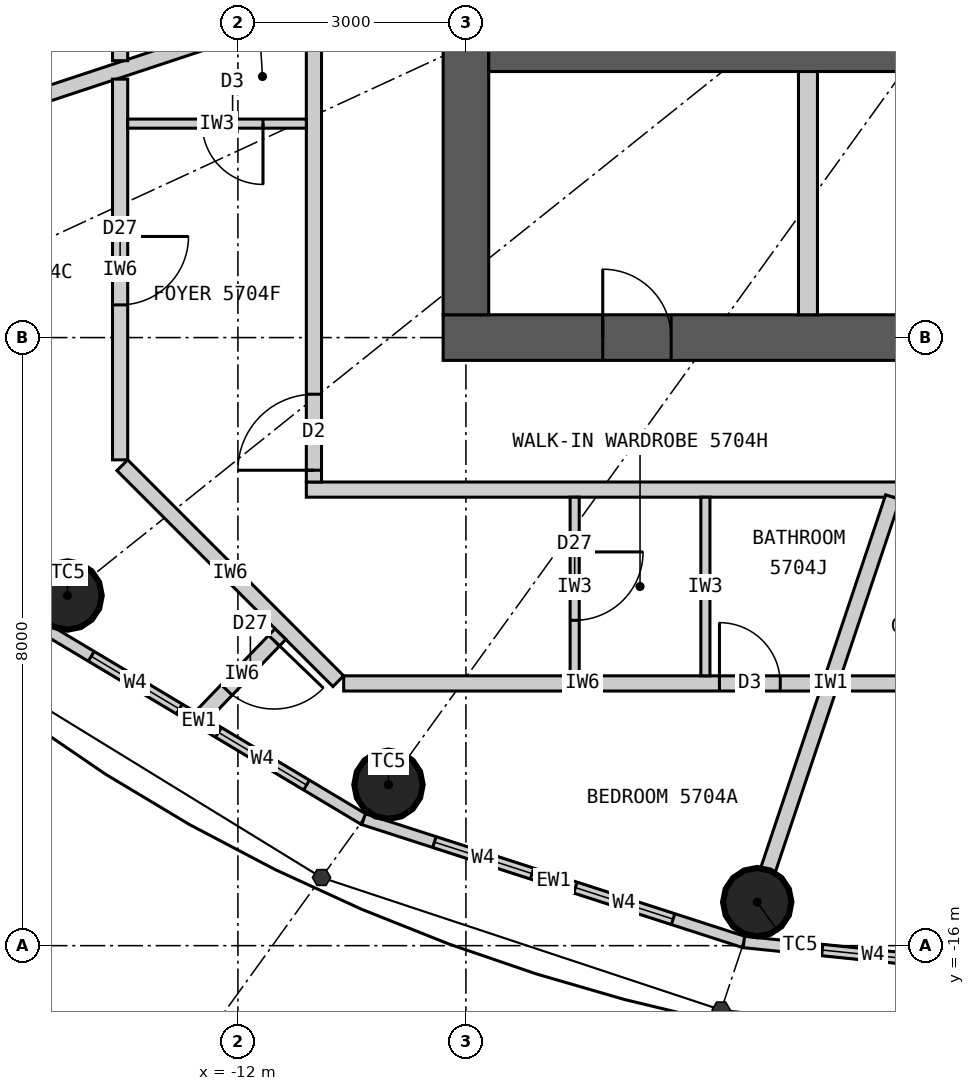
"""IFC4 building model, lengths in metres.
Left out: names, types, materials, properties, quantities, classifications, styles, units other than length and angle.
Written with IfcOpenShell. Run it as: python <this file> out.ifc"""

import sys

from ifc_helpers import new_model, si_unit, direction, frame, frame_2d, origin, origin_2d, place, context, subcontext, project, spatial, rectangle, circle, extrude, element, fill, save


model = new_model("IFC4")
c1 = context("Model", 3, precision=1e-05, world=origin(), true_north=direction((0.0, 1.0)))
c2 = subcontext(c1, "Body", "Model", "MODEL_VIEW")
j1 = project(units=[si_unit("LENGTHUNIT", "METRE"), si_unit("PLANEANGLEUNIT", "RADIAN")], contexts=[c1])
p1 = place(None, origin())
s1 = spatial("IfcSite", under=j1, at=p1, CompositionType="ELEMENT")
p2 = place(p1, origin())
s2 = spatial("IfcBuilding", under=s1, at=p2, CompositionType="ELEMENT")
p3 = place(p2, frame((0.0, 0.0, 212.7)))
s3 = spatial("IfcBuildingStorey", under=s2, at=p3, CompositionType="ELEMENT", Elevation=212.7)
for number, where, z_axis, x_axis in (
    (1, (-14.241, -11.393, 0.0), (0.0, 0.0, 1.0), (1.0, 0.0, 0.0)),
    (2, (-10.019, -13.883, 0.0), (0.0, 0.0, 1.0), (1.0, 0.0, 0.0)),
    (3, (-5.167, -15.427, 0.0), (0.0, 0.0, 1.0), (1.0, 0.0, 0.0)),
):
    element("IfcColumn", number, at=place(p3, frame(where, z_axis=z_axis, x_axis=x_axis)), inside=s3, PredefinedType="COLUMN", context=c2, shape_type="SweptSolid", body=[
        extrude(circle(Radius=0.45, at=origin_2d()), origin(), (0.0, 0.0, 1.0), 3.3),
    ])
p4 = place(p3, frame((9.3, -8.0, 0.0), z_axis=(0.0, 0.0, 1.0), x_axis=(-1.0, 0.0, 0.0)))
e4 = element("IfcWall", 4, at=p4, inside=s3, PredefinedType="SHEAR", context=c2, shape_type="SweptSolid", body=[
    extrude(rectangle(XDim=18.6, YDim=0.6, at=frame_2d((9.3, 0.0))), origin(), (0.0, 0.0, 1.0), 3.3),
])
p5 = place(p4, frame((8.0, 0.0, 0.0)))
e5 = element("IfcOpeningElement", 5, at=p5, cuts=e4, PredefinedType="OPENING", context=c2, shape_type="SweptSolid", body=[
    extrude(rectangle(XDim=1.2, YDim=2.2, at=frame_2d((0.6, 1.1))), frame((0.0, 0.31, 0.0), z_axis=(0.0, -1.0, 0.0), x_axis=(1.0, 0.0, 0.0)), (0.0, 0.0, 1.0), 0.62),
])
p6 = place(p4, frame((15.6, 0.0, 0.0)))
e6 = element("IfcOpeningElement", 6, at=p6, cuts=e4, PredefinedType="OPENING", context=c2, shape_type="SweptSolid", body=[
    extrude(rectangle(XDim=0.9, YDim=2.2, at=frame_2d((0.45, 1.1))), frame((0.0, 0.31, 0.0), z_axis=(0.0, -1.0, 0.0), x_axis=(1.0, 0.0, 0.0)), (0.0, 0.0, 1.0), 0.62),
])
p7 = place(p3, frame((-9.0, 7.7, 0.0), z_axis=(0.0, 0.0, 1.0), x_axis=(0.0, -1.0, 0.0)))
e7 = element("IfcWall", 7, at=p7, inside=s3, PredefinedType="SHEAR", context=c2, shape_type="SweptSolid", body=[
    extrude(rectangle(XDim=15.4, YDim=0.6, at=frame_2d((7.7, 0.0))), origin(), (0.0, 0.0, 1.0), 3.3),
])
p8 = place(p7, frame((6.8, 0.0, 0.0)))
e8 = element("IfcOpeningElement", 8, at=p8, cuts=e7, PredefinedType="OPENING", context=c2, shape_type="SweptSolid", body=[
    extrude(rectangle(XDim=1.8, YDim=2.2, at=frame_2d((0.9, 1.1))), frame((0.0, 0.31, 0.0), z_axis=(0.0, -1.0, 0.0), x_axis=(1.0, 0.0, 0.0)), (0.0, 0.0, 1.0), 0.62),
])
p9 = place(p3, frame((-8.7, -4.3, 0.0), z_axis=(0.0, 0.0, 1.0), x_axis=(1.0, 0.0, 0.0)))
e9 = element("IfcWall", 9, at=p9, inside=s3, PredefinedType="SHEAR", context=c2, shape_type="SweptSolid", body=[
    extrude(rectangle(XDim=17.4, YDim=0.4, at=frame_2d((8.7, 0.0))), origin(), (0.0, 0.0, 1.0), 3.3),
])
p10 = place(p3, frame((-4.5, -7.7, 0.0), z_axis=(0.0, 0.0, 1.0), x_axis=(0.0, 1.0, 0.0)))
e10 = element("IfcWall", 10, at=p10, inside=s3, PredefinedType="PARTITIONING", context=c2, shape_type="SweptSolid", body=[
    extrude(rectangle(XDim=3.2, YDim=0.25, at=frame_2d((1.6, 0.0))), origin(), (0.0, 0.0, 1.0), 3.3),
])
p11 = place(p3, frame((-14.68, -11.744, 0.0), z_axis=(0.0, 0.0, 1.0), x_axis=(0.85822150553, -0.513279502265, 0.0)))
e11 = element("IfcWall", 11, at=p11, inside=s3, PredefinedType="ELEMENTEDWALL", context=c2, shape_type="SweptSolid", body=[
    extrude(rectangle(XDim=5.05, YDim=0.15, at=frame_2d((2.525, 0.0))), origin(), (0.0, 0.0, 1.0), 3.12),
])
p12 = place(p11, frame((0.875, 0.0, 0.9)))
e12 = element("IfcOpeningElement", 12, at=p12, cuts=e11, PredefinedType="OPENING", context=c2, shape_type="SweptSolid", body=[
    extrude(rectangle(XDim=1.35, YDim=1.9, at=frame_2d((0.675, 0.95))), frame((0.0, 0.085, 0.0), z_axis=(0.0, -1.0, 0.0), x_axis=(1.0, 0.0, 0.0)), (0.0, 0.0, 1.0), 0.17),
])
p13 = place(p11, frame((2.825, 0.0, 0.9)))
e13 = element("IfcOpeningElement", 13, at=p13, cuts=e11, PredefinedType="OPENING", context=c2, shape_type="SweptSolid", body=[
    extrude(rectangle(XDim=1.35, YDim=1.9, at=frame_2d((0.675, 0.95))), frame((0.0, 0.085, 0.0), z_axis=(0.0, -1.0, 0.0), x_axis=(1.0, 0.0, 0.0)), (0.0, 0.0, 1.0), 0.17),
])
p14 = place(p3, frame((-10.346, -14.336, 0.0), z_axis=(0.0, 0.0, 1.0), x_axis=(0.951644702515, -0.307200846638, 0.0)))
e14 = element("IfcWall", 14, at=p14, inside=s3, PredefinedType="ELEMENTEDWALL", context=c2, shape_type="SweptSolid", body=[
    extrude(rectangle(XDim=5.258, YDim=0.15, at=frame_2d((2.629, 0.0))), origin(), (0.0, 0.0, 1.0), 3.12),
])
p15 = place(p14, frame((0.979, 0.0, 0.9)))
e15 = element("IfcOpeningElement", 15, at=p15, cuts=e14, PredefinedType="OPENING", context=c2, shape_type="SweptSolid", body=[
    extrude(rectangle(XDim=1.35, YDim=1.9, at=frame_2d((0.675, 0.95))), frame((0.0, 0.085, 0.0), z_axis=(0.0, -1.0, 0.0), x_axis=(1.0, 0.0, 0.0)), (0.0, 0.0, 1.0), 0.17),
])
p16 = place(p14, frame((2.929, 0.0, 0.9)))
e16 = element("IfcOpeningElement", 16, at=p16, cuts=e14, PredefinedType="OPENING", context=c2, shape_type="SweptSolid", body=[
    extrude(rectangle(XDim=1.35, YDim=1.9, at=frame_2d((0.675, 0.95))), frame((0.0, 0.085, 0.0), z_axis=(0.0, -1.0, 0.0), x_axis=(1.0, 0.0, 0.0)), (0.0, 0.0, 1.0), 0.17),
])
p17 = place(p3, frame((-5.343, -15.952, 0.0), z_axis=(0.0, 0.0, 1.0), x_axis=(0.994774574972, -0.102095763818, 0.0)))
e17 = element("IfcWall", 17, at=p17, inside=s3, PredefinedType="ELEMENTEDWALL", context=c2, shape_type="SweptSolid", body=[
    extrude(rectangle(XDim=5.371, YDim=0.15, at=frame_2d((2.686, 0.0))), origin(), (0.0, 0.0, 1.0), 3.12),
])
p18 = place(p17, frame((1.035, 0.0, 0.9)))
e18 = element("IfcOpeningElement", 18, at=p18, cuts=e17, PredefinedType="OPENING", context=c2, shape_type="SweptSolid", body=[
    extrude(rectangle(XDim=1.35, YDim=1.9, at=frame_2d((0.675, 0.95))), frame((0.0, 0.085, 0.0), z_axis=(0.0, -1.0, 0.0), x_axis=(1.0, 0.0, 0.0)), (0.0, 0.0, 1.0), 0.17),
])
p19 = place(p17, frame((2.985, 0.0, 0.9)))
e19 = element("IfcOpeningElement", 19, at=p19, cuts=e17, PredefinedType="OPENING", context=c2, shape_type="SweptSolid", body=[
    extrude(rectangle(XDim=1.35, YDim=1.9, at=frame_2d((0.675, 0.95))), frame((0.0, 0.085, 0.0), z_axis=(0.0, -1.0, 0.0), x_axis=(1.0, 0.0, 0.0)), (0.0, 0.0, 1.0), 0.17),
])
p20 = place(p3, frame((11.1, -10.0, 0.0), z_axis=(0.0, 0.0, 1.0), x_axis=(-1.0, 0.0, 0.0)))
e20 = element("IfcWall", 20, at=p20, inside=s3, PredefinedType="PARTITIONING", context=c2, shape_type="SweptSolid", body=[
    extrude(rectangle(XDim=22.2, YDim=0.2, at=frame_2d((11.1, 0.0))), origin(), (0.0, 0.0, 1.0), 3.12),
])
p21 = place(p20, frame((11.36, 0.0, 0.0)))
e21 = element("IfcOpeningElement", 21, at=p21, cuts=e20, PredefinedType="OPENING", context=c2, shape_type="SweptSolid", body=[
    extrude(rectangle(XDim=1.0, YDim=2.2, at=frame_2d((0.5, 1.1))), frame((0.0, 0.11, 0.0), z_axis=(0.0, -1.0, 0.0), x_axis=(1.0, 0.0, 0.0)), (0.0, 0.0, 1.0), 0.22),
])
p22 = place(p20, frame((0.595, 0.0, 0.0)))
e22 = element("IfcOpeningElement", 22, at=p22, cuts=e20, PredefinedType="OPENING", context=c2, shape_type="SweptSolid", body=[
    extrude(rectangle(XDim=1.0, YDim=2.2, at=frame_2d((0.5, 1.1))), frame((0.0, 0.11, 0.0), z_axis=(0.0, -1.0, 0.0), x_axis=(1.0, 0.0, 0.0)), (0.0, 0.0, 1.0), 0.22),
])
p23 = place(p3, frame((-11.0, 9.9, 0.0), z_axis=(0.0, 0.0, 1.0), x_axis=(0.0, -1.0, 0.0)))
e23 = element("IfcWall", 23, at=p23, inside=s3, PredefinedType="PARTITIONING", context=c2, shape_type="SweptSolid", body=[
    extrude(rectangle(XDim=19.8, YDim=0.2, at=frame_2d((9.9, 0.0))), origin(), (0.0, 0.0, 1.0), 3.12),
])
p24 = place(p23, frame((5.075, 0.0, 0.0)))
e24 = element("IfcOpeningElement", 24, at=p24, cuts=e23, PredefinedType="OPENING", context=c2, shape_type="SweptSolid", body=[
    extrude(rectangle(XDim=1.0, YDim=2.2, at=frame_2d((0.5, 1.1))), frame((0.0, 0.11, 0.0), z_axis=(0.0, -1.0, 0.0), x_axis=(1.0, 0.0, 0.0)), (0.0, 0.0, 1.0), 0.22),
])
p25 = place(p23, frame((18.645, 0.0, 0.0)))
e25 = element("IfcOpeningElement", 25, at=p25, cuts=e23, PredefinedType="OPENING", context=c2, shape_type="SweptSolid", body=[
    extrude(rectangle(XDim=1.0, YDim=2.2, at=frame_2d((0.5, 1.1))), frame((0.0, 0.11, 0.0), z_axis=(0.0, -1.0, 0.0), x_axis=(1.0, 0.0, 0.0)), (0.0, 0.0, 1.0), 0.22),
])
p26 = place(p3, frame((-11.1, -3.669, 0.0), z_axis=(0.0, 0.0, 1.0), x_axis=(-0.949476668397, -0.313837627079, 0.0)))
e26 = element("IfcWall", 26, at=p26, inside=s3, PredefinedType="PARTITIONING", context=c2, shape_type="SweptSolid", body=[
    extrude(rectangle(XDim=8.339, YDim=0.2, at=frame_2d((4.169, 0.0))), origin(), (0.0, 0.0, 1.0), 3.12),
])
p27 = place(p3, frame((-3.383, -10.1, 0.0), z_axis=(0.0, 0.0, 1.0), x_axis=(-0.317602151035, -0.948224063003, 0.0)))
e27 = element("IfcWall", 27, at=p27, inside=s3, PredefinedType="PARTITIONING", context=c2, shape_type="SweptSolid", body=[
    extrude(rectangle(XDim=5.168, YDim=0.2, at=frame_2d((2.584, 0.0))), origin(), (0.0, 0.0, 1.0), 2.42),
])
p28 = place(p3, frame((-13.55, 8.139, 0.0), z_axis=(0.0, 0.0, 1.0), x_axis=(0.0, -1.0, 0.0)))
e28 = element("IfcWall", 28, at=p28, inside=s3, PredefinedType="PARTITIONING", context=c2, shape_type="SweptSolid", body=[
    extrude(rectangle(XDim=12.496, YDim=0.2, at=frame_2d((6.248, 0.0))), origin(), (0.0, 0.0, 1.0), 3.12),
])
p29 = place(p28, frame((7.031, 0.0, 0.0)))
e29 = element("IfcOpeningElement", 29, at=p29, cuts=e28, PredefinedType="OPENING", context=c2, shape_type="SweptSolid", body=[
    extrude(rectangle(XDim=0.9, YDim=2.1, at=frame_2d((0.45, 1.05))), frame((0.0, 0.11, 0.0), z_axis=(0.0, -1.0, 0.0), x_axis=(1.0, 0.0, 0.0)), (0.0, 0.0, 1.0), 0.22),
])
p30 = place(p28, frame((9.373, 0.0, 0.0)))
e30 = element("IfcOpeningElement", 30, at=p30, cuts=e28, PredefinedType="OPENING", context=c2, shape_type="SweptSolid", body=[
    extrude(rectangle(XDim=0.8, YDim=2.1, at=frame_2d((0.4, 1.05))), frame((0.0, 0.11, 0.0), z_axis=(0.0, -1.0, 0.0), x_axis=(1.0, 0.0, 0.0)), (0.0, 0.0, 1.0), 0.22),
])
p31 = place(p28, frame((3.789, 0.0, 0.0)))
e31 = element("IfcOpeningElement", 31, at=p31, cuts=e28, PredefinedType="OPENING", context=c2, shape_type="SweptSolid", body=[
    extrude(rectangle(XDim=0.9, YDim=2.1, at=frame_2d((0.45, 1.05))), frame((0.0, 0.11, 0.0), z_axis=(0.0, -1.0, 0.0), x_axis=(1.0, 0.0, 0.0)), (0.0, 0.0, 1.0), 0.22),
])
p32 = place(p3, frame((-13.55, -4.6, 0.0), z_axis=(0.0, 0.0, 1.0), x_axis=(0.0, -1.0, 0.0)))
e32 = element("IfcWall", 32, at=p32, inside=s3, PredefinedType="PARTITIONING", context=c2, shape_type="SweptSolid", body=[
    extrude(rectangle(XDim=5.009, YDim=0.2, at=frame_2d((2.504, 0.0))), origin(), (0.0, 0.0, 1.0), 3.12),
])
p33 = place(p32, frame((2.07, 0.0, 0.0)))
e33 = element("IfcOpeningElement", 33, at=p33, cuts=e32, PredefinedType="OPENING", context=c2, shape_type="SweptSolid", body=[
    extrude(rectangle(XDim=0.9, YDim=2.1, at=frame_2d((0.45, 1.05))), frame((0.0, 0.11, 0.0), z_axis=(0.0, -1.0, 0.0), x_axis=(1.0, 0.0, 0.0)), (0.0, 0.0, 1.0), 0.22),
])
p34 = place(p3, frame((-13.521, -9.679, 0.0), z_axis=(0.0, 0.0, 1.0), x_axis=(0.707106781187, -0.707106781187, 0.0)))
e34 = element("IfcWall", 34, at=p34, inside=s3, PredefinedType="PARTITIONING", context=c2, shape_type="SweptSolid", body=[
    extrude(rectangle(XDim=4.019, YDim=0.2, at=frame_2d((2.009, 0.0))), origin(), (0.0, 0.0, 1.0), 3.12),
])
p35 = place(p3, frame((-10.609, -12.55, 0.0), z_axis=(0.0, 0.0, 1.0), x_axis=(1.0, 0.0, 0.0)))
e35 = element("IfcWall", 35, at=p35, inside=s3, PredefinedType="PARTITIONING", context=c2, shape_type="SweptSolid", body=[
    extrude(rectangle(XDim=6.284, YDim=0.2, at=frame_2d((3.142, 0.0))), origin(), (0.0, 0.0, 1.0), 3.12),
])
p36 = place(p35, frame((4.944, 0.0, 0.0)))
e36 = element("IfcOpeningElement", 36, at=p36, cuts=e35, PredefinedType="OPENING", context=c2, shape_type="SweptSolid", body=[
    extrude(rectangle(XDim=0.8, YDim=2.1, at=frame_2d((0.4, 1.05))), frame((0.0, 0.11, 0.0), z_axis=(0.0, -1.0, 0.0), x_axis=(1.0, 0.0, 0.0)), (0.0, 0.0, 1.0), 0.22),
])
p37 = place(p3, frame((-11.441, -11.9, 0.0), z_axis=(0.0, 0.0, 1.0), x_axis=(-0.692958717259, -0.720977264672, 0.0)))
e37 = element("IfcWall", 37, at=p37, inside=s3, PredefinedType="PARTITIONING", context=c2, shape_type="SweptSolid", body=[
    extrude(rectangle(XDim=1.464, YDim=0.2, at=frame_2d((0.732, 0.0))), origin(), (0.0, 0.0, 1.0), 3.12),
])
p38 = place(p37, frame((0.12, 0.0, 0.0)))
e38 = element("IfcOpeningElement", 38, at=p38, cuts=e37, PredefinedType="OPENING", context=c2, shape_type="SweptSolid", body=[
    extrude(rectangle(XDim=0.9, YDim=2.1, at=frame_2d((0.45, 1.05))), frame((0.0, 0.11, 0.0), z_axis=(0.0, -1.0, 0.0), x_axis=(1.0, 0.0, 0.0)), (0.0, 0.0, 1.0), 0.22),
])
p39 = place(p3, frame((-11.1, -5.185, 0.0), z_axis=(0.0, 0.0, 1.0), x_axis=(-1.0, 0.0, 0.0)))
e39 = element("IfcWall", 39, at=p39, inside=s3, PredefinedType="PARTITIONING", context=c2, shape_type="SweptSolid", body=[
    extrude(rectangle(XDim=2.35, YDim=0.12, at=frame_2d((1.175, 0.0))), origin(), (0.0, 0.0, 1.0), 3.12),
])
p40 = place(p39, frame((0.57, 0.0, 0.0)))
e40 = element("IfcOpeningElement", 40, at=p40, cuts=e39, PredefinedType="OPENING", context=c2, shape_type="SweptSolid", body=[
    extrude(rectangle(XDim=0.8, YDim=2.1, at=frame_2d((0.4, 1.05))), frame((0.0, 0.07, 0.0), z_axis=(0.0, -1.0, 0.0), x_axis=(1.0, 0.0, 0.0)), (0.0, 0.0, 1.0), 0.14),
])
p41 = place(p3, frame((-7.569, -10.1, 0.0), z_axis=(0.0, 0.0, 1.0), x_axis=(0.0, -1.0, 0.0)))
e41 = element("IfcWall", 41, at=p41, inside=s3, PredefinedType="PARTITIONING", context=c2, shape_type="SweptSolid", body=[
    extrude(rectangle(XDim=2.35, YDim=0.12, at=frame_2d((1.175, 0.0))), origin(), (0.0, 0.0, 1.0), 3.12),
])
p42 = place(p41, frame((0.72, 0.0, 0.0)))
e42 = element("IfcOpeningElement", 42, at=p42, cuts=e41, PredefinedType="OPENING", context=c2, shape_type="SweptSolid", body=[
    extrude(rectangle(XDim=0.9, YDim=2.1, at=frame_2d((0.45, 1.05))), frame((0.0, 0.07, 0.0), z_axis=(0.0, -1.0, 0.0), x_axis=(1.0, 0.0, 0.0)), (0.0, 0.0, 1.0), 0.14),
])
p43 = place(p3, frame((-5.849, -10.1, 0.0), z_axis=(0.0, 0.0, 1.0), x_axis=(0.0, -1.0, 0.0)))
e43 = element("IfcWall", 43, at=p43, inside=s3, PredefinedType="PARTITIONING", context=c2, shape_type="SweptSolid", body=[
    extrude(rectangle(XDim=2.35, YDim=0.12, at=frame_2d((1.175, 0.0))), origin(), (0.0, 0.0, 1.0), 3.12),
])
p44 = place(p3, frame((-4.082, -12.55, 0.0), z_axis=(0.0, 0.0, 1.0), x_axis=(1.0, 0.0, 0.0)))
e44 = element("IfcWall", 44, at=p44, inside=s3, PredefinedType="PARTITIONING", context=c2, shape_type="SweptSolid", body=[
    extrude(rectangle(XDim=10.446, YDim=0.2, at=frame_2d((5.223, 0.0))), origin(), (0.0, 0.0, 1.0), 3.12),
])
p45 = place(p44, frame((6.757, 0.0, 0.0)))
e45 = element("IfcOpeningElement", 45, at=p45, cuts=e44, PredefinedType="OPENING", context=c2, shape_type="SweptSolid", body=[
    extrude(rectangle(XDim=0.8, YDim=2.1, at=frame_2d((0.4, 1.05))), frame((0.0, 0.11, 0.0), z_axis=(0.0, -1.0, 0.0), x_axis=(1.0, 0.0, 0.0)), (0.0, 0.0, 1.0), 0.22),
])
p46 = place(p44, frame((3.372, 0.0, 0.0)))
e46 = element("IfcOpeningElement", 46, at=p46, cuts=e44, PredefinedType="OPENING", context=c2, shape_type="SweptSolid", body=[
    extrude(rectangle(XDim=0.9, YDim=2.1, at=frame_2d((0.45, 1.05))), frame((0.0, 0.11, 0.0), z_axis=(0.0, -1.0, 0.0), x_axis=(1.0, 0.0, 0.0)), (0.0, 0.0, 1.0), 0.22),
])
p47 = place(p12, origin())
e47 = element("IfcWindow", 47, at=p47, inside=s3, PartitioningType="SINGLE_PANEL", PredefinedType="WINDOW", context=c2, shape_type="SweptSolid", body=[
    extrude(rectangle(XDim=1.35, YDim=1.9, at=frame_2d((0.675, 0.95))), frame((0.0, 0.03, 0.0), z_axis=(0.0, -1.0, 0.0), x_axis=(1.0, 0.0, 0.0)), (0.0, 0.0, 1.0), 0.06),
])
fill(e12, e47)
p48 = place(p13, origin())
e48 = element("IfcWindow", 48, at=p48, inside=s3, PartitioningType="SINGLE_PANEL", PredefinedType="WINDOW", context=c2, shape_type="SweptSolid", body=[
    extrude(rectangle(XDim=1.35, YDim=1.9, at=frame_2d((0.675, 0.95))), frame((0.0, 0.03, 0.0), z_axis=(0.0, -1.0, 0.0), x_axis=(1.0, 0.0, 0.0)), (0.0, 0.0, 1.0), 0.06),
])
fill(e13, e48)
p49 = place(p15, origin())
e49 = element("IfcWindow", 49, at=p49, inside=s3, PartitioningType="SINGLE_PANEL", PredefinedType="WINDOW", context=c2, shape_type="SweptSolid", body=[
    extrude(rectangle(XDim=1.35, YDim=1.9, at=frame_2d((0.675, 0.95))), frame((0.0, 0.03, 0.0), z_axis=(0.0, -1.0, 0.0), x_axis=(1.0, 0.0, 0.0)), (0.0, 0.0, 1.0), 0.06),
])
fill(e15, e49)
p50 = place(p16, origin())
e50 = element("IfcWindow", 50, at=p50, inside=s3, PartitioningType="SINGLE_PANEL", PredefinedType="WINDOW", context=c2, shape_type="SweptSolid", body=[
    extrude(rectangle(XDim=1.35, YDim=1.9, at=frame_2d((0.675, 0.95))), frame((0.0, 0.03, 0.0), z_axis=(0.0, -1.0, 0.0), x_axis=(1.0, 0.0, 0.0)), (0.0, 0.0, 1.0), 0.06),
])
fill(e16, e50)
p51 = place(p18, origin())
e51 = element("IfcWindow", 51, at=p51, inside=s3, PartitioningType="SINGLE_PANEL", PredefinedType="WINDOW", context=c2, shape_type="SweptSolid", body=[
    extrude(rectangle(XDim=1.35, YDim=1.9, at=frame_2d((0.675, 0.95))), frame((0.0, 0.03, 0.0), z_axis=(0.0, -1.0, 0.0), x_axis=(1.0, 0.0, 0.0)), (0.0, 0.0, 1.0), 0.06),
])
fill(e18, e51)
p52 = place(p25, origin())
e52 = element("IfcDoor", 52, at=p52, inside=s3, OperationType="SINGLE_SWING_RIGHT", PredefinedType="DOOR", context=c2, shape_type="SweptSolid", body=[
    extrude(rectangle(XDim=1.0, YDim=2.2, at=frame_2d((0.5, 1.1))), frame((0.0, 0.025, 0.0), z_axis=(0.0, -1.0, 0.0), x_axis=(1.0, 0.0, 0.0)), (0.0, 0.0, 1.0), 0.05),
])
fill(e25, e52)
p53 = place(p40, origin())
e53 = element("IfcDoor", 53, at=p53, inside=s3, OperationType="SINGLE_SWING_LEFT", PredefinedType="DOOR", context=c2, shape_type="SweptSolid", body=[
    extrude(rectangle(XDim=0.8, YDim=2.1, at=frame_2d((0.4, 1.05))), frame((0.0, 0.025, 0.0), z_axis=(0.0, -1.0, 0.0), x_axis=(1.0, 0.0, 0.0)), (0.0, 0.0, 1.0), 0.05),
])
fill(e40, e53)
p54 = place(p42, origin())
e54 = element("IfcDoor", 54, at=p54, inside=s3, OperationType="SINGLE_SWING_LEFT", PredefinedType="DOOR", context=c2, shape_type="SweptSolid", body=[
    extrude(rectangle(XDim=0.9, YDim=2.1, at=frame_2d((0.45, 1.05))), frame((0.0, 0.025, 0.0), z_axis=(0.0, -1.0, 0.0), x_axis=(1.0, 0.0, 0.0)), (0.0, 0.0, 1.0), 0.05),
])
fill(e42, e54)
p55 = place(p36, origin())
e55 = element("IfcDoor", 55, at=p55, inside=s3, OperationType="SINGLE_SWING_LEFT", PredefinedType="DOOR", context=c2, shape_type="SweptSolid", body=[
    extrude(rectangle(XDim=0.8, YDim=2.1, at=frame_2d((0.4, 1.05))), frame((0.0, 0.025, 0.0), z_axis=(0.0, -1.0, 0.0), x_axis=(1.0, 0.0, 0.0)), (0.0, 0.0, 1.0), 0.05),
])
fill(e36, e55)
p56 = place(p33, origin())
e56 = element("IfcDoor", 56, at=p56, inside=s3, OperationType="SINGLE_SWING_LEFT", PredefinedType="DOOR", context=c2, shape_type="SweptSolid", body=[
    extrude(rectangle(XDim=0.9, YDim=2.1, at=frame_2d((0.45, 1.05))), frame((0.0, 0.025, 0.0), z_axis=(0.0, -1.0, 0.0), x_axis=(1.0, 0.0, 0.0)), (0.0, 0.0, 1.0), 0.05),
])
fill(e33, e56)
p57 = place(p38, origin())
e57 = element("IfcDoor", 57, at=p57, inside=s3, OperationType="SINGLE_SWING_LEFT", PredefinedType="DOOR", context=c2, shape_type="SweptSolid", body=[
    extrude(rectangle(XDim=0.9, YDim=2.1, at=frame_2d((0.45, 1.05))), frame((0.0, 0.025, 0.0), z_axis=(0.0, -1.0, 0.0), x_axis=(1.0, 0.0, 0.0)), (0.0, 0.0, 1.0), 0.05),
])
fill(e38, e57)
p58 = place(p6, origin())
e58 = element("IfcDoor", 58, at=p58, inside=s3, OperationType="SINGLE_SWING_RIGHT", PredefinedType="DOOR", context=c2, shape_type="SweptSolid", body=[
    extrude(rectangle(XDim=0.9, YDim=2.2, at=frame_2d((0.45, 1.1))), frame((0.0, 0.025, 0.0), z_axis=(0.0, -1.0, 0.0), x_axis=(1.0, 0.0, 0.0)), (0.0, 0.0, 1.0), 0.05),
])
fill(e6, e58)
save(model, sys.argv[1])
